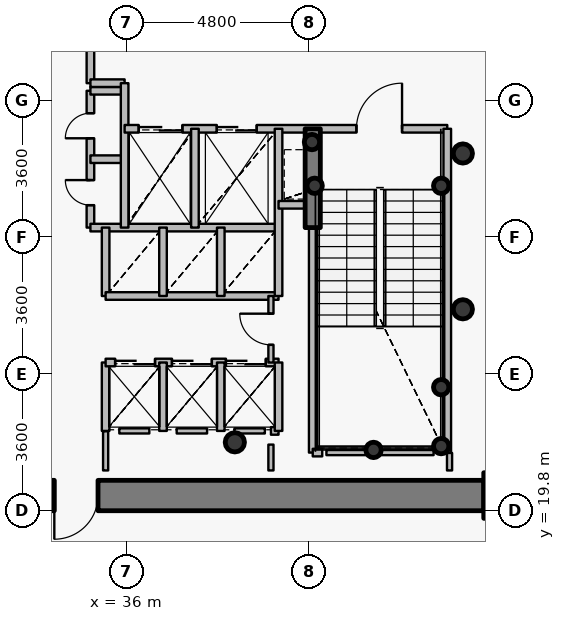
"""IFC4 building model, lengths in metres.
Left out: names, types, materials, properties, quantities, classifications, styles, units other than length and angle.
Written with IfcOpenShell. Run it as: python <this file> out.ifc"""

import sys

from ifc_helpers import new_model, si_unit, direction, frame, frame_2d, origin, origin_2d, place, context, subcontext, project, spatial, rectangle, hollow_circle, extrude, source, transform, mapped, element, fill, save


model = new_model("IFC4")
c1 = context("Model", 3, precision=1e-05, world=origin(), true_north=direction((0.0, 1.0)))
c2 = subcontext(c1, "Body", "Model", "MODEL_VIEW")
j1 = project(units=[si_unit("LENGTHUNIT", "METRE"), si_unit("PLANEANGLEUNIT", "RADIAN")], contexts=[c1])
p1 = place(None, origin())
s1 = spatial("IfcSite", under=j1, at=p1, CompositionType="ELEMENT")
p2 = place(p1, origin())
s2 = spatial("IfcBuilding", under=s1, at=p2, CompositionType="ELEMENT")
p3 = place(p2, frame((0.0, 0.0, 108.45)))
s3 = spatial("IfcBuildingStorey", under=s2, at=p3, CompositionType="ELEMENT", Elevation=108.45)
p4 = place(p3, frame((46.0, 20.2, 0.0), z_axis=(0.0, 0.0, 1.0), x_axis=(1.0, 0.0, 0.0)))
e1 = element("IfcColumn", 1, at=p4, inside=s3, PredefinedType="COLUMN", context=c2, shape_type="SweptSolid", body=[
    extrude(rectangle(XDim=1.2, YDim=1.2, at=origin_2d()), origin(), (0.0, 0.0, 1.0), 3.75),
])
p5 = place(p3, frame((38.85, 21.6, 0.0), z_axis=(0.0, 0.0, 1.0), x_axis=(1.0, 0.0, 0.0)))
e2 = element("IfcColumn", 2, at=p5, inside=s3, PredefinedType="COLUMN", context=c2, shape_type="SweptSolid", body=[
    extrude(hollow_circle(Radius=0.254, WallThickness=0.02, at=origin_2d()), origin(), (0.0, 0.0, 1.0), 3.75),
])
for number, where, z_axis, x_axis in (
    (3, (44.28, 21.5, 0.0), (0.0, 0.0, 1.0), (1.0, 0.0, 0.0)),
    (4, (44.28, 23.05, 0.0), (0.0, 0.0, 1.0), (1.0, 0.0, 0.0)),
    (5, (42.5, 21.4, 0.0), (0.0, 0.0, 1.0), (1.0, 0.0, 0.0)),
    (6, (40.95, 28.35, 0.0), (0.0, 0.0, 1.0), (1.0, 0.0, 0.0)),
    (7, (44.28, 28.35, 0.0), (0.0, 0.0, 1.0), (1.0, 0.0, 0.0)),
    (8, (40.88, 29.5, 0.0), (0.0, 0.0, 1.0), (1.0, 0.0, 0.0)),
):
    element("IfcColumn", number, at=place(p3, frame(where, z_axis=z_axis, x_axis=x_axis)), inside=s3, PredefinedType="COLUMN", context=c2, shape_type="SweptSolid", body=[
        extrude(hollow_circle(Radius=0.203, WallThickness=0.016, at=origin_2d()), origin(), (0.0, 0.0, 1.0), 3.75),
    ])
p6 = place(p3, frame((45.4, 20.2, 0.0), z_axis=(0.0, 0.0, 1.0), x_axis=(-1.0, 0.0, 0.0)))
e9 = element("IfcWall", 9, at=p6, inside=s3, PredefinedType="SHEAR", context=c2, shape_type="SweptSolid", body=[
    extrude(rectangle(XDim=18.8, YDim=0.8, at=frame_2d((9.4, 0.0))), origin(), (0.0, 0.0, 1.0), 2.95),
])
p7 = place(p6, frame((10.15, 0.0, 0.0)))
e10 = element("IfcOpeningElement", 10, at=p7, cuts=e9, PredefinedType="OPENING", context=c2, shape_type="SweptSolid", body=[
    extrude(rectangle(XDim=1.15, YDim=2.15, at=origin_2d()), frame((0.575, 0.41, 1.075), z_axis=(0.0, -1.0, 0.0), x_axis=(1.0, 0.0, 0.0)), (0.0, 0.0, 1.0), 0.82),
])
p8 = place(p3, frame((40.9, 27.25, 0.0), z_axis=(0.0, 0.0, 1.0), x_axis=(0.0, 1.0, 0.0)))
e11 = element("IfcWall", 11, at=p8, inside=s3, PredefinedType="SHEAR", context=c2, shape_type="SweptSolid", body=[
    extrude(rectangle(XDim=2.6, YDim=0.4, at=frame_2d((1.3, 0.0))), origin(), (0.0, 0.0, 1.0), 3.1),
])
for number, where, z_axis, x_axis in (
    (12, (44.85, 25.1, 0.0), (0.0, 0.0, 1.0), (1.0, 0.0, 0.0)),
    (13, (44.85, 29.2, 0.0), (0.0, 0.0, 1.0), (1.0, 0.0, 0.0)),
):
    element("IfcColumn", number, at=place(p3, frame(where, z_axis=z_axis, x_axis=x_axis)), inside=s3, PredefinedType="COLUMN", context=c2, shape_type="SweptSolid", body=[
        extrude(hollow_circle(Radius=0.254, WallThickness=0.02, at=origin_2d()), origin(), (0.0, 0.0, 1.0), 3.75),
    ])
p9 = place(p3, frame((35.05, 27.25, 0.0), z_axis=(0.0, 0.0, 1.0), x_axis=(0.0, 1.0, 0.0)))
e14 = element("IfcWall", 14, at=p9, inside=s3, PredefinedType="PARTITIONING", context=c2, shape_type="SweptSolid", body=[
    extrude(rectangle(XDim=3.6, YDim=0.2, at=frame_2d((1.8, 0.0))), origin(), (0.0, 0.0, 1.0), 3.5),
])
p10 = place(p9, frame((0.59, 0.0, 0.0)))
e15 = element("IfcOpeningElement", 15, at=p10, cuts=e14, PredefinedType="OPENING", context=c2, shape_type="SweptSolid", body=[
    extrude(rectangle(XDim=0.66, YDim=2.05, at=origin_2d()), frame((0.33, 0.11, 1.025), z_axis=(0.0, -1.0, 0.0), x_axis=(1.0, 0.0, 0.0)), (0.0, 0.0, 1.0), 0.22),
])
p11 = place(p9, frame((2.35, 0.0, 0.0)))
e16 = element("IfcOpeningElement", 16, at=p11, cuts=e14, PredefinedType="OPENING", context=c2, shape_type="SweptSolid", body=[
    extrude(rectangle(XDim=0.66, YDim=2.05, at=origin_2d()), frame((0.33, 0.11, 1.025), z_axis=(0.0, -1.0, 0.0), x_axis=(1.0, 0.0, 0.0)), (0.0, 0.0, 1.0), 0.22),
])
p12 = place(p3, frame((35.05, 27.25, 0.0), z_axis=(0.0, 0.0, 1.0), x_axis=(1.0, 0.0, 0.0)))
e17 = element("IfcWall", 17, at=p12, inside=s3, PredefinedType="PARTITIONING", context=c2, shape_type="SweptSolid", body=[
    extrude(rectangle(XDim=4.95, YDim=0.2, at=frame_2d((2.475, 0.0))), origin(), (0.0, 0.0, 1.0), 3.085),
])
for number, where, z_axis, x_axis in (
    (18, (35.05, 29.05, 0.0), (0.0, 0.0, 1.0), (1.0, 0.0, 0.0)),
    (19, (35.05, 30.85, 0.0), (0.0, 0.0, 1.0), (1.0, 0.0, 0.0)),
):
    element("IfcWall", number, at=place(p3, frame(where, z_axis=z_axis, x_axis=x_axis)), inside=s3, PredefinedType="PARTITIONING", context=c2, shape_type="SweptSolid", body=[
        extrude(rectangle(XDim=0.9, YDim=0.2, at=frame_2d((0.45, 0.0))), origin(), (0.0, 0.0, 1.0), 3.5),
    ])
p13 = place(p3, frame((35.05, 31.05, 0.0), z_axis=(0.0, 0.0, 1.0), x_axis=(0.0, 1.0, 0.0)))
e20 = element("IfcWall", 20, at=p13, inside=s3, PredefinedType="PARTITIONING", context=c2, shape_type="SweptSolid", body=[
    extrude(rectangle(XDim=2.35, YDim=0.2, at=frame_2d((1.175, 0.0))), origin(), (0.0, 0.0, 1.0), 3.085),
])
p14 = place(p3, frame((35.05, 31.05, 0.0), z_axis=(0.0, 0.0, 1.0), x_axis=(1.0, 0.0, 0.0)))
e21 = element("IfcWall", 21, at=p14, inside=s3, PredefinedType="PARTITIONING", context=c2, shape_type="SweptSolid", body=[
    extrude(rectangle(XDim=0.9, YDim=0.2, at=frame_2d((0.45, 0.0))), origin(), (0.0, 0.0, 1.0), 3.5),
])
p15 = place(p3, frame((35.45, 21.9, 0.0), z_axis=(0.0, 0.0, 1.0), x_axis=(0.0, 1.0, 0.0)))
e22 = element("IfcWall", 22, at=p15, inside=s3, PredefinedType="PARTITIONING", context=c2, shape_type="SweptSolid", body=[
    extrude(rectangle(XDim=1.8, YDim=0.2, at=frame_2d((0.9, 0.0))), origin(), (0.0, 0.0, 1.0), 3.5),
])
p16 = place(p3, frame((35.45, 23.7, 0.0), z_axis=(0.0, 0.0, 1.0), x_axis=(1.0, 0.0, 0.0)))
e23 = element("IfcWall", 23, at=p16, inside=s3, PredefinedType="PARTITIONING", context=c2, shape_type="SweptSolid", body=[
    extrude(rectangle(XDim=4.55, YDim=0.2, at=frame_2d((2.275, 0.0))), origin(), (0.0, 0.0, 1.0), 3.085),
])
p17 = place(p16, frame((0.25, 0.0, 0.0)))
e24 = element("IfcOpeningElement", 24, at=p17, cuts=e23, PredefinedType="OPENING", context=c2, shape_type="SweptSolid", body=[
    extrude(rectangle(XDim=1.05, YDim=2.15, at=origin_2d()), frame((0.525, 0.11, 1.075), z_axis=(0.0, -1.0, 0.0), x_axis=(1.0, 0.0, 0.0)), (0.0, 0.0, 1.0), 0.22),
])
p18 = place(p16, frame((1.745, 0.0, 0.0)))
e25 = element("IfcOpeningElement", 25, at=p18, cuts=e23, PredefinedType="OPENING", context=c2, shape_type="SweptSolid", body=[
    extrude(rectangle(XDim=1.05, YDim=2.15, at=origin_2d()), frame((0.525, 0.11, 1.075), z_axis=(0.0, -1.0, 0.0), x_axis=(1.0, 0.0, 0.0)), (0.0, 0.0, 1.0), 0.22),
])
p19 = place(p16, frame((3.165, 0.0, 0.0)))
e26 = element("IfcOpeningElement", 26, at=p19, cuts=e23, PredefinedType="OPENING", context=c2, shape_type="SweptSolid", body=[
    extrude(rectangle(XDim=1.05, YDim=2.15, at=origin_2d()), frame((0.525, 0.11, 1.075), z_axis=(0.0, -1.0, 0.0), x_axis=(1.0, 0.0, 0.0)), (0.0, 0.0, 1.0), 0.22),
])
p20 = place(p3, frame((35.45, 25.45, 0.0), z_axis=(0.0, 0.0, 1.0), x_axis=(0.0, 1.0, 0.0)))
e27 = element("IfcWall", 27, at=p20, inside=s3, PredefinedType="PARTITIONING", context=c2, shape_type="SweptSolid", body=[
    extrude(rectangle(XDim=1.8, YDim=0.2, at=frame_2d((0.9, 0.0))), origin(), (0.0, 0.0, 1.0), 3.5),
])
p21 = place(p3, frame((35.45, 25.45, 0.0), z_axis=(0.0, 0.0, 1.0), x_axis=(1.0, 0.0, 0.0)))
e28 = element("IfcWall", 28, at=p21, inside=s3, PredefinedType="PARTITIONING", context=c2, shape_type="SweptSolid", body=[
    extrude(rectangle(XDim=4.55, YDim=0.2, at=frame_2d((2.275, 0.0))), origin(), (0.0, 0.0, 1.0), 3.085),
])
p22 = place(p3, frame((35.95, 27.25, 0.0), z_axis=(0.0, 0.0, 1.0), x_axis=(0.0, 1.0, 0.0)))
e29 = element("IfcWall", 29, at=p22, inside=s3, PredefinedType="PARTITIONING", context=c2, shape_type="SweptSolid", body=[
    extrude(rectangle(XDim=3.8, YDim=0.2, at=frame_2d((1.9, 0.0))), origin(), (0.0, 0.0, 1.0), 3.5),
])
p23 = place(p3, frame((35.95, 29.85, 0.0), z_axis=(0.0, 0.0, 1.0), x_axis=(1.0, 0.0, 0.0)))
e30 = element("IfcWall", 30, at=p23, inside=s3, PredefinedType="PARTITIONING", context=c2, shape_type="SweptSolid", body=[
    extrude(rectangle(XDim=8.49, YDim=0.2, at=frame_2d((4.245, 0.0))), origin(), (0.0, 0.0, 1.0), 3.085),
])
p24 = place(p23, frame((6.1, 0.0, 0.0)))
e31 = element("IfcOpeningElement", 31, at=p24, cuts=e30, PredefinedType="OPENING", context=c2, shape_type="SweptSolid", body=[
    extrude(rectangle(XDim=1.2, YDim=2.15, at=origin_2d()), frame((0.6, 0.11, 1.075), z_axis=(0.0, -1.0, 0.0), x_axis=(1.0, 0.0, 0.0)), (0.0, 0.0, 1.0), 0.22),
])
p25 = place(p23, frame((0.37, 0.0, 0.0)))
e32 = element("IfcOpeningElement", 32, at=p25, cuts=e30, PredefinedType="OPENING", context=c2, shape_type="SweptSolid", body=[
    extrude(rectangle(XDim=1.15, YDim=2.15, at=origin_2d()), frame((0.575, 0.11, 1.075), z_axis=(0.0, -1.0, 0.0), x_axis=(1.0, 0.0, 0.0)), (0.0, 0.0, 1.0), 0.22),
])
p26 = place(p23, frame((2.425, 0.0, 0.0)))
e33 = element("IfcOpeningElement", 33, at=p26, cuts=e30, PredefinedType="OPENING", context=c2, shape_type="SweptSolid", body=[
    extrude(rectangle(XDim=1.05, YDim=2.15, at=origin_2d()), frame((0.525, 0.11, 1.075), z_axis=(0.0, -1.0, 0.0), x_axis=(1.0, 0.0, 0.0)), (0.0, 0.0, 1.0), 0.22),
])
for number, where, z_axis, x_axis in (
    (34, (36.96, 21.9, 0.0), (0.0, 0.0, 1.0), (0.0, 1.0, 0.0)),
    (35, (36.96, 25.45, 0.0), (0.0, 0.0, 1.0), (0.0, 1.0, 0.0)),
):
    element("IfcWall", number, at=place(p3, frame(where, z_axis=z_axis, x_axis=x_axis)), inside=s3, PredefinedType="PARTITIONING", context=c2, shape_type="SweptSolid", body=[
        extrude(rectangle(XDim=1.8, YDim=0.2, at=frame_2d((0.9, 0.0))), origin(), (0.0, 0.0, 1.0), 3.5),
    ])
p27 = place(p3, frame((37.8, 27.25, 0.0), z_axis=(0.0, 0.0, 1.0), x_axis=(0.0, 1.0, 0.0)))
e36 = element("IfcWall", 36, at=p27, inside=s3, PredefinedType="PARTITIONING", context=c2, shape_type="SweptSolid", body=[
    extrude(rectangle(XDim=2.6, YDim=0.2, at=frame_2d((1.3, 0.0))), origin(), (0.0, 0.0, 1.0), 3.5),
])
for number, where, z_axis, x_axis in (
    (37, (38.48, 21.9, 0.0), (0.0, 0.0, 1.0), (0.0, 1.0, 0.0)),
    (38, (38.48, 25.45, 0.0), (0.0, 0.0, 1.0), (0.0, 1.0, 0.0)),
):
    element("IfcWall", number, at=place(p3, frame(where, z_axis=z_axis, x_axis=x_axis)), inside=s3, PredefinedType="PARTITIONING", context=c2, shape_type="SweptSolid", body=[
        extrude(rectangle(XDim=1.8, YDim=0.2, at=frame_2d((0.9, 0.0))), origin(), (0.0, 0.0, 1.0), 3.5),
    ])
p28 = place(p3, frame((39.8, 21.9, 0.0), z_axis=(0.0, 0.0, 1.0), x_axis=(1.0, 0.0, 0.0)))
e39 = element("IfcWall", 39, at=p28, inside=s3, PredefinedType="PARTITIONING", context=c2, shape_type="SweptSolid", body=[
    extrude(rectangle(XDim=0.2, YDim=0.2, at=frame_2d((0.1, 0.0))), origin(), (0.0, 0.0, 1.0), 3.5),
])
p29 = place(p3, frame((39.8, 23.7, 0.0), z_axis=(0.0, 0.0, 1.0), x_axis=(0.0, 1.0, 0.0)))
e40 = element("IfcWall", 40, at=p29, inside=s3, PredefinedType="PARTITIONING", context=c2, shape_type="SweptSolid", body=[
    extrude(rectangle(XDim=1.75, YDim=0.135, at=frame_2d((0.875, 0.0))), origin(), (0.0, 0.0, 1.0), 3.5),
])
p30 = place(p29, frame((0.465, 0.0, 0.0)))
e41 = element("IfcOpeningElement", 41, at=p30, cuts=e40, PredefinedType="OPENING", context=c2, shape_type="SweptSolid", body=[
    extrude(rectangle(XDim=0.82, YDim=2.1, at=origin_2d()), frame((0.41, 0.078, 1.05), z_axis=(0.0, -1.0, 0.0), x_axis=(1.0, 0.0, 0.0)), (0.0, 0.0, 1.0), 0.155),
])
p31 = place(p3, frame((40.0, 21.9, 0.0), z_axis=(0.0, 0.0, 1.0), x_axis=(0.0, 1.0, 0.0)))
e42 = element("IfcWall", 42, at=p31, inside=s3, PredefinedType="PARTITIONING", context=c2, shape_type="SweptSolid", body=[
    extrude(rectangle(XDim=1.8, YDim=0.2, at=frame_2d((0.9, 0.0))), origin(), (0.0, 0.0, 1.0), 3.5),
])
p32 = place(p3, frame((40.0, 25.45, 0.0), z_axis=(0.0, 0.0, 1.0), x_axis=(0.0, 1.0, 0.0)))
e43 = element("IfcWall", 43, at=p32, inside=s3, PredefinedType="PARTITIONING", context=c2, shape_type="SweptSolid", body=[
    extrude(rectangle(XDim=4.4, YDim=0.2, at=frame_2d((2.2, 0.0))), origin(), (0.0, 0.0, 1.0), 3.5),
])
p33 = place(p3, frame((40.0, 27.85, 0.0), z_axis=(0.0, 0.0, 1.0), x_axis=(1.0, 0.0, 0.0)))
e44 = element("IfcWall", 44, at=p33, inside=s3, PredefinedType="PARTITIONING", context=c2, shape_type="SweptSolid", body=[
    extrude(rectangle(XDim=0.9, YDim=0.2, at=frame_2d((0.45, 0.0))), origin(), (0.0, 0.0, 1.0), 3.5),
])
p34 = place(p3, frame((40.9, 21.33, 0.0), z_axis=(0.0, 0.0, 1.0), x_axis=(0.0, 1.0, 0.0)))
e45 = element("IfcWall", 45, at=p34, inside=s3, PredefinedType="PARTITIONING", context=c2, shape_type="SweptSolid", body=[
    extrude(rectangle(XDim=5.91, YDim=0.2, at=frame_2d((2.955, 0.0))), origin(), (0.0, 0.0, 1.0), 3.035),
])
p35 = place(p3, frame((40.9, 21.33, 0.0), z_axis=(0.0, 0.0, 1.0), x_axis=(1.0, 0.0, 0.0)))
e46 = element("IfcWall", 46, at=p35, inside=s3, PredefinedType="PARTITIONING", context=c2, shape_type="SweptSolid", body=[
    extrude(rectangle(XDim=0.25, YDim=0.2, at=frame_2d((0.125, 0.0))), origin(), (0.0, 0.0, 1.0), 3.035),
])
p36 = place(p3, frame((44.44, 21.33, 0.0), z_axis=(0.0, 0.0, 1.0), x_axis=(0.0, 1.0, 0.0)))
e47 = element("IfcWall", 47, at=p36, inside=s3, PredefinedType="PARTITIONING", context=c2, shape_type="SweptSolid", body=[
    extrude(rectangle(XDim=8.52, YDim=0.2, at=frame_2d((4.26, 0.0))), origin(), (0.0, 0.0, 1.0), 3.5),
])
p37 = place(p3, frame((44.08, 21.33, 0.0), z_axis=(0.0, 0.0, 1.0), x_axis=(-1.0, 0.0, 0.0)))
e48 = element("IfcWall", 48, at=p37, inside=s3, PredefinedType="PARTITIONING", context=c2, shape_type="SweptSolid", body=[
    extrude(rectangle(XDim=2.82, YDim=0.135, at=frame_2d((1.41, 0.0))), origin(), (0.0, 0.0, 1.0), 3.035),
])
p38 = place(p3, frame((36.6, 21.9, 0.0), z_axis=(0.0, 0.0, 1.0), x_axis=(-1.0, 0.0, 0.0)))
e49 = element("IfcWall", 49, at=p38, inside=s3, PredefinedType="PARTITIONING", context=c2, shape_type="SweptSolid", body=[
    extrude(rectangle(XDim=0.79, YDim=0.135, at=frame_2d((0.395, 0.0))), origin(), (0.0, 0.0, 1.0), 3.5),
])
p39 = place(p3, frame((38.12, 21.9, 0.0), z_axis=(0.0, 0.0, 1.0), x_axis=(-1.0, 0.0, 0.0)))
e50 = element("IfcWall", 50, at=p39, inside=s3, PredefinedType="PARTITIONING", context=c2, shape_type="SweptSolid", body=[
    extrude(rectangle(XDim=0.8, YDim=0.135, at=frame_2d((0.4, 0.0))), origin(), (0.0, 0.0, 1.0), 3.5),
])
p40 = place(p3, frame((39.64, 21.9, 0.0), z_axis=(0.0, 0.0, 1.0), x_axis=(-1.0, 0.0, 0.0)))
e51 = element("IfcWall", 51, at=p40, inside=s3, PredefinedType="PARTITIONING", context=c2, shape_type="SweptSolid", body=[
    extrude(rectangle(XDim=0.8, YDim=0.135, at=frame_2d((0.4, 0.0))), origin(), (0.0, 0.0, 1.0), 3.085),
])
p41 = place(p3, frame((39.8, 20.86, 0.0), z_axis=(0.0, 0.0, 1.0), x_axis=(0.0, 1.0, 0.0)))
e52 = element("IfcWall", 52, at=p41, inside=s3, PredefinedType="PARTITIONING", context=c2, shape_type="SweptSolid", body=[
    extrude(rectangle(XDim=0.68, YDim=0.135, at=frame_2d((0.34, 0.0))), origin(), (0.0, 0.0, 1.0), 3.035),
])
p42 = place(p3, frame((44.5, 20.86, 0.0), z_axis=(0.0, 0.0, 1.0), x_axis=(0.0, 1.0, 0.0)))
e53 = element("IfcWall", 53, at=p42, inside=s3, PredefinedType="PARTITIONING", context=c2, shape_type="SweptSolid", body=[
    extrude(rectangle(XDim=0.46, YDim=0.135, at=frame_2d((0.23, 0.0))), origin(), (0.0, 0.0, 1.0), 3.5),
])
p43 = place(p3, frame((35.45, 21.89, 0.0), z_axis=(0.0, 0.0, 1.0), x_axis=(0.0, -1.0, 0.0)))
e54 = element("IfcWall", 54, at=p43, inside=s3, PredefinedType="PARTITIONING", context=c2, shape_type="SweptSolid", body=[
    extrude(rectangle(XDim=1.03, YDim=0.135, at=frame_2d((0.515, 0.0))), origin(), (0.0, 0.0, 1.0), 3.085),
])
p44 = place(p3, frame((45.41, 19.8, 0.0), z_axis=(0.0, 0.0, 1.0), x_axis=(1.0, 0.0, 0.0)))
e55 = element("IfcWall", 55, at=p44, inside=s3, PredefinedType="PARTITIONING", context=c2, shape_type="SweptSolid", body=[
    extrude(rectangle(XDim=0.99, YDim=0.135, at=frame_2d((0.495, 0.0))), origin(), (0.0, 0.0, 1.0), 2.935),
])
m1 = source(origin(), c2, "Body", "SweptSolid", [
    extrude(rectangle(XDim=1.15, YDim=2.15, at=origin_2d()), frame((0.575, 0.025, 1.075), z_axis=(0.0, -1.0, 0.0), x_axis=(1.0, 0.0, 0.0)), (0.0, 0.0, 1.0), 0.05),
])
p45 = place(p7, origin())
e56 = element("IfcDoor", 56, at=p45, inside=s3, OperationType="SINGLE_SWING_RIGHT", PredefinedType="DOOR", context=c2, shape_type="MappedRepresentation", body=[
    mapped(m1, transform((0.0, 0.0, 0.0), x_axis=(1.0, 0.0, 0.0), y_axis=(0.0, 1.0, 0.0), z_axis=(0.0, 0.0, 1.0), scale=1.0)),
])
fill(e10, e56)
m2 = source(origin(), c2, "Body", "SweptSolid", [
    extrude(rectangle(XDim=1.2, YDim=2.15, at=origin_2d()), frame((0.6, 0.025, 1.075), z_axis=(0.0, -1.0, 0.0), x_axis=(1.0, 0.0, 0.0)), (0.0, 0.0, 1.0), 0.05),
])
p46 = place(p24, origin())
e57 = element("IfcDoor", 57, at=p46, inside=s3, OperationType="SINGLE_SWING_RIGHT", PredefinedType="DOOR", context=c2, shape_type="MappedRepresentation", body=[
    mapped(m2, transform((0.0, 0.0, 0.0), x_axis=(1.0, 0.0, 0.0), y_axis=(0.0, 1.0, 0.0), z_axis=(0.0, 0.0, 1.0), scale=1.0)),
])
fill(e31, e57)
m3 = source(origin(), c2, "Body", "SweptSolid", [
    extrude(rectangle(XDim=1.15, YDim=2.15, at=origin_2d()), frame((0.575, 0.025, 1.075), z_axis=(0.0, -1.0, 0.0), x_axis=(1.0, 0.0, 0.0)), (0.0, 0.0, 1.0), 0.05),
])
p47 = place(p25, origin())
e58 = element("IfcDoor", 58, at=p47, inside=s3, OperationType="DOUBLE_DOOR_SLIDING", PredefinedType="USERDEFINED", context=c2, shape_type="MappedRepresentation", body=[
    mapped(m3, transform((0.0, 0.0, 0.0), x_axis=(1.0, 0.0, 0.0), y_axis=(0.0, 1.0, 0.0), z_axis=(0.0, 0.0, 1.0), scale=1.0)),
])
fill(e32, e58)
m4 = source(origin(), c2, "Body", "SweptSolid", [
    extrude(rectangle(XDim=1.05, YDim=2.15, at=origin_2d()), frame((0.525, 0.025, 1.075), z_axis=(0.0, -1.0, 0.0), x_axis=(1.0, 0.0, 0.0)), (0.0, 0.0, 1.0), 0.05),
])
p48 = place(p26, origin())
e59 = element("IfcDoor", 59, at=p48, inside=s3, OperationType="DOUBLE_DOOR_SLIDING", PredefinedType="USERDEFINED", context=c2, shape_type="MappedRepresentation", body=[
    mapped(m4, transform((0.0, 0.0, 0.0), x_axis=(1.0, 0.0, 0.0), y_axis=(0.0, 1.0, 0.0), z_axis=(0.0, 0.0, 1.0), scale=1.0)),
])
fill(e33, e59)
p49 = place(p17, origin())
e60 = element("IfcDoor", 60, at=p49, inside=s3, OperationType="DOUBLE_DOOR_SLIDING", PredefinedType="USERDEFINED", context=c2, shape_type="MappedRepresentation", body=[
    mapped(m4, transform((0.0, 0.0, 0.0), x_axis=(1.0, 0.0, 0.0), y_axis=(0.0, 1.0, 0.0), z_axis=(0.0, 0.0, 1.0), scale=1.0)),
])
fill(e24, e60)
p50 = place(p18, origin())
e61 = element("IfcDoor", 61, at=p50, inside=s3, OperationType="DOUBLE_DOOR_SLIDING", PredefinedType="USERDEFINED", context=c2, shape_type="MappedRepresentation", body=[
    mapped(m4, transform((0.0, 0.0, 0.0), x_axis=(1.0, 0.0, 0.0), y_axis=(0.0, 1.0, 0.0), z_axis=(0.0, 0.0, 1.0), scale=1.0)),
])
fill(e25, e61)
p51 = place(p19, origin())
e62 = element("IfcDoor", 62, at=p51, inside=s3, OperationType="DOUBLE_DOOR_SLIDING", PredefinedType="USERDEFINED", context=c2, shape_type="MappedRepresentation", body=[
    mapped(m4, transform((0.0, 0.0, 0.0), x_axis=(1.0, 0.0, 0.0), y_axis=(0.0, 1.0, 0.0), z_axis=(0.0, 0.0, 1.0), scale=1.0)),
])
fill(e26, e62)
m5 = source(origin(), c2, "Body", "SweptSolid", [
    extrude(rectangle(XDim=0.66, YDim=2.05, at=origin_2d()), frame((0.33, 0.025, 1.025), z_axis=(0.0, -1.0, 0.0), x_axis=(1.0, 0.0, 0.0)), (0.0, 0.0, 1.0), 0.05),
])
p52 = place(p10, origin())
e63 = element("IfcDoor", 63, at=p52, inside=s3, OperationType="SINGLE_SWING_RIGHT", PredefinedType="USERDEFINED", context=c2, shape_type="MappedRepresentation", body=[
    mapped(m5, transform((0.0, 0.0, 0.0), x_axis=(1.0, 0.0, 0.0), y_axis=(0.0, 1.0, 0.0), z_axis=(0.0, 0.0, 1.0), scale=1.0)),
])
fill(e15, e63)
p53 = place(p11, origin())
e64 = element("IfcDoor", 64, at=p53, inside=s3, OperationType="SINGLE_SWING_LEFT", PredefinedType="USERDEFINED", context=c2, shape_type="MappedRepresentation", body=[
    mapped(m5, transform((0.0, 0.0, 0.0), x_axis=(1.0, 0.0, 0.0), y_axis=(0.0, 1.0, 0.0), z_axis=(0.0, 0.0, 1.0), scale=1.0)),
])
fill(e16, e64)
m6 = source(origin(), c2, "Body", "SweptSolid", [
    extrude(rectangle(XDim=0.82, YDim=2.1, at=origin_2d()), frame((0.41, 0.025, 1.05), z_axis=(0.0, -1.0, 0.0), x_axis=(1.0, 0.0, 0.0)), (0.0, 0.0, 1.0), 0.05),
])
p54 = place(p30, origin())
e65 = element("IfcDoor", 65, at=p54, inside=s3, OperationType="SINGLE_SWING_RIGHT", PredefinedType="DOOR", context=c2, shape_type="MappedRepresentation", body=[
    mapped(m6, transform((0.0, 0.0, 0.0), x_axis=(1.0, 0.0, 0.0), y_axis=(0.0, 1.0, 0.0), z_axis=(0.0, 0.0, 1.0), scale=1.0)),
])
fill(e41, e65)
save(model, sys.argv[1])
